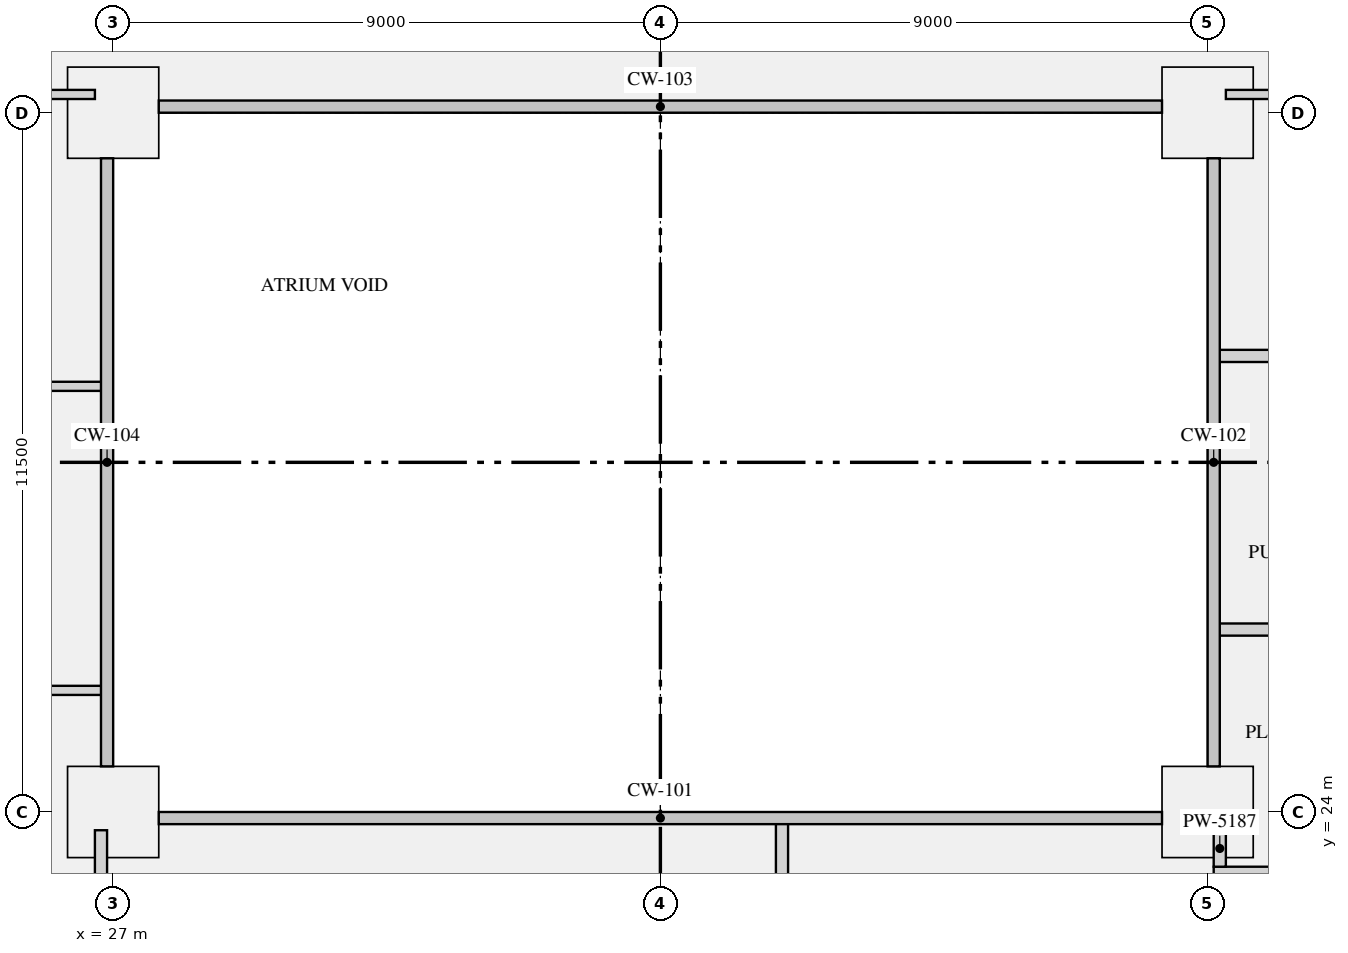
"""IFC4 building model, lengths in metres.
Left out: names, types, materials, properties, quantities, classifications, styles, units other than length and angle.
Written with IfcOpenShell. Run it as: python <this file> out.ifc"""

import sys

from ifc_helpers import new_model, si_unit, direction, frame, frame_2d, origin, origin_2d, place, context, subcontext, project, spatial, rectangle, extrude, element, save


model = new_model("IFC4")
c1 = context("Model", 3, precision=1e-05, world=origin(), true_north=direction((0.0, 1.0)))
c2 = subcontext(c1, "Body", "Model", "MODEL_VIEW")
j1 = project(units=[si_unit("LENGTHUNIT", "METRE"), si_unit("PLANEANGLEUNIT", "RADIAN")], contexts=[c1])
p1 = place(None, origin())
s1 = spatial("IfcSite", under=j1, at=p1, CompositionType="ELEMENT")
p2 = place(p1, origin())
s2 = spatial("IfcBuilding", under=s1, at=p2, CompositionType="ELEMENT")
p3 = place(p2, frame((0.0, 0.0, 73.05)))
s3 = spatial("IfcBuildingStorey", under=s2, at=p3, CompositionType="ELEMENT", Elevation=73.05)
for number, where, z_axis, x_axis in (
    (1, (27.0, 24.0, 0.0), (0.0, 0.0, 1.0), (1.0, 0.0, 0.0)),
    (2, (45.0, 24.0, 0.0), (0.0, 0.0, 1.0), (1.0, 0.0, 0.0)),
    (3, (27.0, 35.5, 0.0), (0.0, 0.0, 1.0), (1.0, 0.0, 0.0)),
    (4, (45.0, 35.5, 0.0), (0.0, 0.0, 1.0), (1.0, 0.0, 0.0)),
):
    element("IfcColumn", number, at=place(p3, frame(where, z_axis=z_axis, x_axis=x_axis)), inside=s3, PredefinedType="COLUMN", context=c2, shape_type="SweptSolid", body=[
        extrude(rectangle(XDim=1.5, YDim=1.5, at=origin_2d()), origin(), (0.0, 0.0, 1.0), 4.2),
    ])
p4 = place(p3, frame((45.1, 23.0, 0.0), z_axis=(0.0, 0.0, 1.0), x_axis=(1.0, 0.0, 0.0)))
e5 = element("IfcWall", 5, at=p4, inside=s3, PredefinedType="PARTITIONING", context=c2, shape_type="SweptSolid", body=[
    extrude(rectangle(XDim=7.175, YDim=0.2, at=frame_2d((3.587, 0.0))), origin(), (0.0, 0.0, 1.0), 3.7),
])
p5 = place(p3, frame((19.725, 26.0, 0.0), z_axis=(0.0, 0.0, 1.0), x_axis=(1.0, 0.0, 0.0)))
e6 = element("IfcWall", 6, at=p5, inside=s3, PredefinedType="PARTITIONING", context=c2, shape_type="SweptSolid", body=[
    extrude(rectangle(XDim=7.179, YDim=0.15, at=frame_2d((3.589, 0.0))), origin(), (0.0, 0.0, 1.0), 3.7),
])
p6 = place(p3, frame((45.096, 27.0, 0.0), z_axis=(0.0, 0.0, 1.0), x_axis=(1.0, 0.0, 0.0)))
e7 = element("IfcWall", 7, at=p6, inside=s3, PredefinedType="PARTITIONING", context=c2, shape_type="SweptSolid", body=[
    extrude(rectangle(XDim=7.204, YDim=0.2, at=frame_2d((3.602, 0.0))), origin(), (0.0, 0.0, 1.0), 3.7),
])
p7 = place(p3, frame((19.725, 31.0, 0.0), z_axis=(0.0, 0.0, 1.0), x_axis=(1.0, 0.0, 0.0)))
e8 = element("IfcWall", 8, at=p7, inside=s3, PredefinedType="PARTITIONING", context=c2, shape_type="SweptSolid", body=[
    extrude(rectangle(XDim=7.179, YDim=0.15, at=frame_2d((3.589, 0.0))), origin(), (0.0, 0.0, 1.0), 3.7),
])
p8 = place(p3, frame((45.096, 31.5, 0.0), z_axis=(0.0, 0.0, 1.0), x_axis=(1.0, 0.0, 0.0)))
e9 = element("IfcWall", 9, at=p8, inside=s3, PredefinedType="PARTITIONING", context=c2, shape_type="SweptSolid", body=[
    extrude(rectangle(XDim=7.179, YDim=0.2, at=frame_2d((3.589, 0.0))), origin(), (0.0, 0.0, 1.0), 3.7),
])
p9 = place(p3, frame((19.725, 35.8, 0.0), z_axis=(0.0, 0.0, 1.0), x_axis=(1.0, 0.0, 0.0)))
e10 = element("IfcWall", 10, at=p9, inside=s3, PredefinedType="PARTITIONING", context=c2, shape_type="SweptSolid", body=[
    extrude(rectangle(XDim=6.975, YDim=0.15, at=frame_2d((3.487, 0.0))), origin(), (0.0, 0.0, 1.0), 3.7),
])
p10 = place(p9, frame((3.075, 0.0, 0.0)))
e11 = element("IfcOpeningElement", 11, at=p10, cuts=e10, PredefinedType="OPENING", context=c2, shape_type="SweptSolid", body=[
    extrude(rectangle(XDim=0.9, YDim=2.1, at=frame_2d((0.45, 1.05))), frame((0.0, 0.085, 0.0), z_axis=(0.0, -1.0, 0.0), x_axis=(1.0, 0.0, 0.0)), (0.0, 0.0, 1.0), 0.17),
])
p11 = place(p3, frame((45.3, 35.8, 0.0), z_axis=(0.0, 0.0, 1.0), x_axis=(1.0, 0.0, 0.0)))
e12 = element("IfcWall", 12, at=p11, inside=s3, PredefinedType="PARTITIONING", context=c2, shape_type="SweptSolid", body=[
    extrude(rectangle(XDim=6.975, YDim=0.15, at=frame_2d((3.487, 0.0))), origin(), (0.0, 0.0, 1.0), 3.7),
])
p12 = place(p11, frame((3.0, 0.0, 0.0)))
e13 = element("IfcOpeningElement", 13, at=p12, cuts=e12, PredefinedType="OPENING", context=c2, shape_type="SweptSolid", body=[
    extrude(rectangle(XDim=0.9, YDim=2.1, at=frame_2d((0.45, 1.05))), frame((0.0, 0.085, 0.0), z_axis=(0.0, -1.0, 0.0), x_axis=(1.0, 0.0, 0.0)), (0.0, 0.0, 1.0), 0.17),
])
p13 = place(p3, frame((26.8, 18.6, 0.0), z_axis=(0.0, 0.0, 1.0), x_axis=(0.0, 1.0, 0.0)))
e14 = element("IfcWall", 14, at=p13, inside=s3, PredefinedType="PARTITIONING", context=c2, shape_type="SweptSolid", body=[
    extrude(rectangle(XDim=5.1, YDim=0.2, at=frame_2d((2.55, 0.0))), origin(), (0.0, 0.0, 1.0), 3.7),
])
p14 = place(p3, frame((38.0, 18.6, 0.0), z_axis=(0.0, 0.0, 1.0), x_axis=(0.0, 1.0, 0.0)))
e15 = element("IfcWall", 15, at=p14, inside=s3, PredefinedType="PARTITIONING", context=c2, shape_type="SweptSolid", body=[
    extrude(rectangle(XDim=5.304, YDim=0.2, at=frame_2d((2.652, 0.0))), origin(), (0.0, 0.0, 1.0), 3.7),
])
p15 = place(p3, frame((45.2, 23.1, 0.0), z_axis=(0.0, 0.0, 1.0), x_axis=(0.0, 1.0, 0.0)))
e16 = element("IfcWall", 16, at=p15, inside=s3, PredefinedType="PARTITIONING", context=c2, shape_type="SweptSolid", body=[
    extrude(rectangle(XDim=0.6, YDim=0.2, at=frame_2d((0.3, 0.0))), origin(), (0.0, 0.0, 1.0), 3.7),
])
save(model, sys.argv[1])
